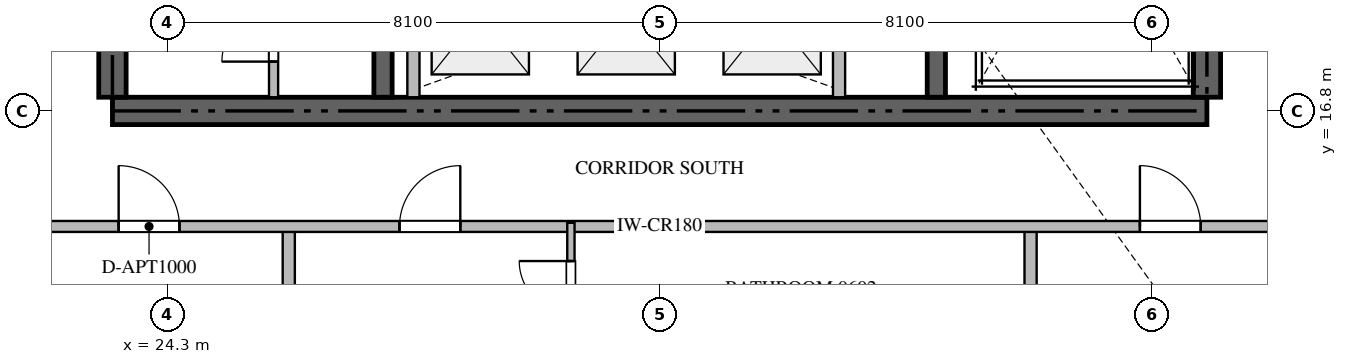
"""IFC4 building model, lengths in metres.
Left out: names, types, materials, properties, quantities, classifications, styles, units other than length and angle.
Written with IfcOpenShell. Run it as: python <this file> out.ifc"""

import sys

from ifc_helpers import new_model, si_unit, direction, frame, frame_2d, origin, place, context, subcontext, project, spatial, rectangle, extrude, source, transform, mapped, element, fill, save


model = new_model("IFC4")
c1 = context("Model", 3, precision=1e-05, world=origin(), true_north=direction((0.0, 1.0)))
c2 = subcontext(c1, "Body", "Model", "MODEL_VIEW")
j1 = project(units=[si_unit("LENGTHUNIT", "METRE"), si_unit("PLANEANGLEUNIT", "RADIAN")], contexts=[c1])
p1 = place(None, origin())
s1 = spatial("IfcSite", under=j1, at=p1, CompositionType="ELEMENT")
p2 = place(p1, origin())
s2 = spatial("IfcBuilding", under=s1, at=p2, CompositionType="ELEMENT")
p3 = place(p2, frame((0.0, 0.0, 30.45)))
s3 = spatial("IfcBuildingStorey", under=s2, at=p3, CompositionType="ELEMENT", Elevation=30.45)
p4 = place(p3, frame((23.4, 16.8, -0.26), z_axis=(0.0, 0.0, 1.0), x_axis=(1.0, 0.0, 0.0)))
e1 = element("IfcWall", 1, at=p4, inside=s3, PredefinedType="SHEAR", context=c2, shape_type="SweptSolid", body=[
    extrude(rectangle(XDim=18.0, YDim=0.45, at=frame_2d((9.0, 0.0))), origin(), (0.0, 0.0, 1.0), 3.748),
])
p5 = place(p3, frame((23.4, 17.025, -0.26), z_axis=(0.0, 0.0, 1.0), x_axis=(0.0, 1.0, 0.0)))
e2 = element("IfcWall", 2, at=p5, inside=s3, PredefinedType="SHEAR", context=c2, shape_type="SweptSolid", body=[
    extrude(rectangle(XDim=4.825, YDim=0.45, at=frame_2d((2.413, 0.0))), origin(), (0.0, 0.0, 1.0), 3.748),
])
p6 = place(p3, frame((41.4, 17.025, -0.26), z_axis=(0.0, 0.0, 1.0), x_axis=(0.0, 1.0, 0.0)))
e3 = element("IfcWall", 3, at=p6, inside=s3, PredefinedType="SHEAR", context=c2, shape_type="SweptSolid", body=[
    extrude(rectangle(XDim=8.325, YDim=0.45, at=frame_2d((4.163, 0.0))), origin(), (0.0, 0.0, 1.0), 3.748),
])
p7 = place(p3, frame((27.85, 17.025, -0.26), z_axis=(0.0, 0.0, 1.0), x_axis=(0.0, 1.0, 0.0)))
e4 = element("IfcWall", 4, at=p7, inside=s3, PredefinedType="SHEAR", context=c2, shape_type="SweptSolid", body=[
    extrude(rectangle(XDim=4.825, YDim=0.3, at=frame_2d((2.413, 0.0))), origin(), (0.0, 0.0, 1.0), 3.748),
])
p8 = place(p3, frame((36.95, 17.025, -0.26), z_axis=(0.0, 0.0, 1.0), x_axis=(0.0, 1.0, 0.0)))
e5 = element("IfcWall", 5, at=p8, inside=s3, PredefinedType="SHEAR", context=c2, shape_type="SweptSolid", body=[
    extrude(rectangle(XDim=8.325, YDim=0.3, at=frame_2d((4.163, 0.0))), origin(), (0.0, 0.0, 1.0), 3.748),
])
for number, where, z_axis, x_axis in (
    (6, (28.35, 17.025, 0.0), (0.0, 0.0, 1.0), (0.0, 1.0, 0.0)),
    (7, (35.35, 17.025, 0.0), (0.0, 0.0, 1.0), (0.0, 1.0, 0.0)),
):
    element("IfcWall", number, at=place(p3, frame(where, z_axis=z_axis, x_axis=x_axis)), inside=s3, PredefinedType="STANDARD", context=c2, shape_type="SweptSolid", body=[
        extrude(rectangle(XDim=2.525, YDim=0.2, at=frame_2d((1.263, 0.0))), origin(), (0.0, 0.0, 1.0), 3.49),
    ])
p9 = place(p3, frame((26.05, 17.025, 0.0), z_axis=(0.0, 0.0, 1.0), x_axis=(0.0, 1.0, 0.0)))
e8 = element("IfcWall", 8, at=p9, inside=s3, PredefinedType="PARTITIONING", context=c2, shape_type="SweptSolid", body=[
    extrude(rectangle(XDim=2.023, YDim=0.15, at=frame_2d((1.012, 0.0))), origin(), (0.0, 0.0, 1.0), 3.49),
])
p10 = place(p9, frame((0.586, 0.0, 0.0)))
e9 = element("IfcOpeningElement", 9, at=p10, cuts=e8, PredefinedType="OPENING", context=c2, shape_type="SweptSolid", body=[
    extrude(rectangle(XDim=0.85, YDim=2.1, at=frame_2d((0.425, 1.05))), frame((0.0, 0.085, 0.0), z_axis=(0.0, -1.0, 0.0), x_axis=(1.0, 0.0, 0.0)), (0.0, 0.0, 1.0), 0.17),
])
for number, where, z_axis, x_axis in (
    (10, (26.3, 0.282, 0.0), (0.0, 0.0, 1.0), (0.0, 1.0, 0.0)),
    (11, (38.5, 0.282, 0.0), (0.0, 0.0, 1.0), (0.0, 1.0, 0.0)),
):
    element("IfcWall", number, at=place(p3, frame(where, z_axis=z_axis, x_axis=x_axis)), inside=s3, PredefinedType="PARTITIONING", context=c2, shape_type="SweptSolid", body=[
        extrude(rectangle(XDim=14.618, YDim=0.2, at=frame_2d((7.309, 0.0))), origin(), (0.0, 0.0, 1.0), 3.49),
    ])
p11 = place(p3, frame((21.402, 14.9, 0.0), z_axis=(0.0, 0.0, 1.0), x_axis=(1.0, 0.0, 0.0)))
e12 = element("IfcWall", 12, at=p11, inside=s3, PredefinedType="PARTITIONING", context=c2, shape_type="SweptSolid", body=[
    extrude(rectangle(XDim=21.996, YDim=0.18, at=frame_2d((10.998, 0.0))), origin(), (0.0, 0.0, 1.0), 3.49),
])
p12 = place(p11, frame((2.1, 0.0, 0.0)))
e13 = element("IfcOpeningElement", 13, at=p12, cuts=e12, PredefinedType="OPENING", context=c2, shape_type="SweptSolid", body=[
    extrude(rectangle(XDim=1.0, YDim=2.15, at=frame_2d((0.5, 1.075))), frame((0.0, 0.1, 0.0), z_axis=(0.0, -1.0, 0.0), x_axis=(1.0, 0.0, 0.0)), (0.0, 0.0, 1.0), 0.2),
])
p13 = place(p11, frame((6.719, 0.0, 0.0)))
e14 = element("IfcOpeningElement", 14, at=p13, cuts=e12, PredefinedType="OPENING", context=c2, shape_type="SweptSolid", body=[
    extrude(rectangle(XDim=1.0, YDim=2.15, at=frame_2d((0.5, 1.075))), frame((0.0, 0.1, 0.0), z_axis=(0.0, -1.0, 0.0), x_axis=(1.0, 0.0, 0.0)), (0.0, 0.0, 1.0), 0.2),
])
p14 = place(p11, frame((18.896, 0.0, 0.0)))
e15 = element("IfcOpeningElement", 15, at=p14, cuts=e12, PredefinedType="OPENING", context=c2, shape_type="SweptSolid", body=[
    extrude(rectangle(XDim=1.0, YDim=2.15, at=frame_2d((0.5, 1.075))), frame((0.0, 0.1, 0.0), z_axis=(0.0, -1.0, 0.0), x_axis=(1.0, 0.0, 0.0)), (0.0, 0.0, 1.0), 0.2),
])
p15 = place(p3, frame((30.94, 12.852, 0.0), z_axis=(0.0, 0.0, 1.0), x_axis=(0.0, 1.0, 0.0)))
e16 = element("IfcWall", 16, at=p15, inside=s3, PredefinedType="PARTITIONING", context=c2, shape_type="SweptSolid", body=[
    extrude(rectangle(XDim=2.108, YDim=0.12, at=frame_2d((1.054, 0.0))), origin(), (0.0, 0.0, 1.0), 3.49),
])
p16 = place(p15, frame((0.629, 0.0, 0.0)))
e17 = element("IfcOpeningElement", 17, at=p16, cuts=e16, PredefinedType="OPENING", context=c2, shape_type="SweptSolid", body=[
    extrude(rectangle(XDim=0.85, YDim=2.1, at=frame_2d((0.425, 1.05))), frame((0.0, 0.07, 0.0), z_axis=(0.0, -1.0, 0.0), x_axis=(1.0, 0.0, 0.0)), (0.0, 0.0, 1.0), 0.14),
])
m1 = source(origin(), c2, "Body", "SweptSolid", [
    extrude(rectangle(XDim=0.85, YDim=2.1, at=frame_2d((0.425, 1.05))), frame((0.0, 0.025, 0.0), z_axis=(0.0, -1.0, 0.0), x_axis=(1.0, 0.0, 0.0)), (0.0, 0.0, 1.0), 0.05),
])
p17 = place(p10, origin())
e18 = element("IfcDoor", 18, at=p17, inside=s3, OperationType="SINGLE_SWING_LEFT", PredefinedType="DOOR", context=c2, shape_type="MappedRepresentation", body=[
    mapped(m1, transform((0.0, 0.0, 0.0), scale=1.0)),
])
fill(e9, e18)
m2 = source(origin(), c2, "Body", "SweptSolid", [
    extrude(rectangle(XDim=1.0, YDim=2.15, at=frame_2d((0.5, 1.075))), frame((0.0, 0.025, 0.0), z_axis=(0.0, -1.0, 0.0), x_axis=(1.0, 0.0, 0.0)), (0.0, 0.0, 1.0), 0.05),
])
p18 = place(p12, origin())
e19 = element("IfcDoor", 19, at=p18, inside=s3, OperationType="SINGLE_SWING_LEFT", PredefinedType="DOOR", context=c2, shape_type="MappedRepresentation", body=[
    mapped(m2, transform((0.0, 0.0, 0.0), scale=1.0)),
])
fill(e13, e19)
p19 = place(p13, origin())
e20 = element("IfcDoor", 20, at=p19, inside=s3, OperationType="SINGLE_SWING_RIGHT", PredefinedType="DOOR", context=c2, shape_type="MappedRepresentation", body=[
    mapped(m2, transform((0.0, 0.0, 0.0), scale=1.0)),
])
fill(e14, e20)
p20 = place(p14, origin())
e21 = element("IfcDoor", 21, at=p20, inside=s3, OperationType="SINGLE_SWING_LEFT", PredefinedType="DOOR", context=c2, shape_type="MappedRepresentation", body=[
    mapped(m2, transform((0.0, 0.0, 0.0), scale=1.0)),
])
fill(e15, e21)
p21 = place(p16, origin())
e22 = element("IfcDoor", 22, at=p21, inside=s3, OperationType="SINGLE_SWING_RIGHT", PredefinedType="DOOR", context=c2, shape_type="MappedRepresentation", body=[
    mapped(m1, transform((0.0, 0.0, 0.0), scale=1.0)),
])
fill(e17, e22)
save(model, sys.argv[1])
